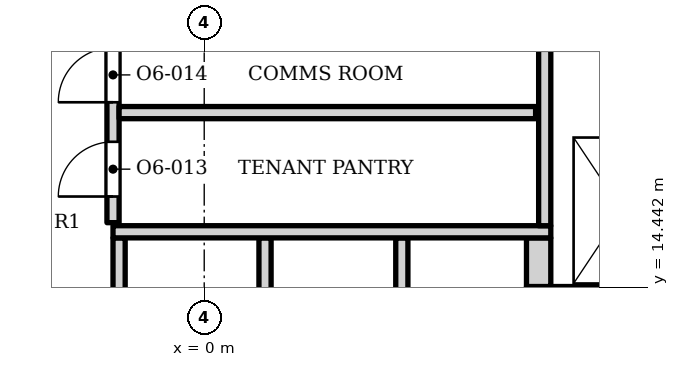
"""IFC4 building model, lengths in metres.
Left out: names, types, materials, properties, quantities, classifications, styles, units other than length and angle.
Written with IfcOpenShell. Run it as: python <this file> out.ifc"""

import sys

from ifc_helpers import new_model, si_unit, direction, frame, frame_2d, origin, place, context, subcontext, project, spatial, rectangle, extrude, element, fill, save


model = new_model("IFC4")
c1 = context("Model", 3, precision=1e-05, world=origin(), true_north=direction((0.0, 1.0)))
c2 = subcontext(c1, "Body", "Model", "MODEL_VIEW")
j1 = project(units=[si_unit("LENGTHUNIT", "METRE"), si_unit("PLANEANGLEUNIT", "RADIAN")], contexts=[c1])
p1 = place(None, origin())
s1 = spatial("IfcSite", under=j1, at=p1, CompositionType="ELEMENT")
p2 = place(p1, origin())
s2 = spatial("IfcBuilding", under=s1, at=p2, CompositionType="ELEMENT")
p3 = place(p2, frame((0.0, 0.0, 208.1)))
s3 = spatial("IfcBuildingStorey", under=s2, at=p3, CompositionType="ELEMENT", Elevation=208.1)
for number, where, z_axis, x_axis in (
    (1, (-1.4, 12.653, 0.0), (0.0, 0.0, 1.0), (0.0, 1.0, 0.0)),
    (2, (1.0, 12.653, 0.0), (0.0, 0.0, 1.0), (0.0, 1.0, 0.0)),
    (3, (3.25, 12.653, 0.0), (0.0, 0.0, 1.0), (0.0, 1.0, 0.0)),
):
    element("IfcWall", number, at=place(p3, frame(where, z_axis=z_axis, x_axis=x_axis)), inside=s3, PredefinedType="SOLIDWALL", context=c2, shape_type="SweptSolid", body=[
        extrude(rectangle(XDim=2.6, YDim=0.2, at=frame_2d((1.3, 0.0))), origin(), (0.0, 0.0, 1.0), 3.73),
    ])
p4 = place(p3, frame((5.5, 14.453, 0.0), z_axis=(0.0, 0.0, 1.0), x_axis=(0.0, 1.0, 0.0)))
e4 = element("IfcWall", 4, at=p4, inside=s3, PredefinedType="SOLIDWALL", context=c2, shape_type="SweptSolid", body=[
    extrude(rectangle(XDim=0.8, YDim=0.4, at=frame_2d((0.4, 0.0))), origin(), (0.0, 0.0, 1.0), 3.73),
])
p5 = place(p3, frame((-1.5, 15.353, 0.0), z_axis=(0.0, 0.0, 1.0), x_axis=(1.0, 0.0, 0.0)))
e5 = element("IfcWall", 5, at=p5, inside=s3, PredefinedType="SOLIDWALL", context=c2, shape_type="SweptSolid", body=[
    extrude(rectangle(XDim=7.2, YDim=0.2, at=frame_2d((3.6, 0.0))), origin(), (0.0, 0.0, 1.0), 3.73),
])
p6 = place(p3, frame((5.6, 15.453, 0.0), z_axis=(0.0, 0.0, 1.0), x_axis=(0.0, 1.0, 0.0)))
e6 = element("IfcWall", 6, at=p6, inside=s3, PredefinedType="SOLIDWALL", context=c2, shape_type="SweptSolid", body=[
    extrude(rectangle(XDim=2.9, YDim=0.2, at=frame_2d((1.45, 0.0))), origin(), (0.0, 0.0, 1.0), 3.73),
])
p7 = place(p3, frame((-1.5, 15.503, 0.0), z_axis=(0.0, 0.0, 1.0), x_axis=(0.0, 1.0, 0.0)))
e7 = element("IfcWall", 7, at=p7, inside=s3, PredefinedType="SOLIDWALL", context=c2, shape_type="SweptSolid", body=[
    extrude(rectangle(XDim=3.05, YDim=0.2, at=frame_2d((1.525, 0.0))), origin(), (0.0, 0.0, 1.0), 3.73),
])
p8 = place(p7, frame((0.43, 0.0, 0.0)))
e8 = element("IfcOpeningElement", 8, at=p8, cuts=e7, PredefinedType="OPENING", context=c2, shape_type="SweptSolid", body=[
    extrude(rectangle(XDim=0.9, YDim=2.1, at=frame_2d((0.45, 1.05))), frame((0.0, 0.11, 0.0), z_axis=(0.0, -1.0, 0.0), x_axis=(1.0, 0.0, 0.0)), (0.0, 0.0, 1.0), 0.22),
])
p9 = place(p7, frame((1.98, 0.0, 0.0)))
e9 = element("IfcOpeningElement", 9, at=p9, cuts=e7, PredefinedType="OPENING", context=c2, shape_type="SweptSolid", body=[
    extrude(rectangle(XDim=0.9, YDim=2.1, at=frame_2d((0.45, 1.05))), frame((0.0, 0.11, 0.0), z_axis=(0.0, -1.0, 0.0), x_axis=(1.0, 0.0, 0.0)), (0.0, 0.0, 1.0), 0.22),
])
p10 = place(p3, frame((-1.4, 17.312, 0.0), z_axis=(0.0, 0.0, 1.0), x_axis=(1.0, 0.0, 0.0)))
e10 = element("IfcWall", 10, at=p10, inside=s3, PredefinedType="SOLIDWALL", context=c2, shape_type="SweptSolid", body=[
    extrude(rectangle(XDim=6.85, YDim=0.2, at=frame_2d((3.425, 0.0))), origin(), (0.0, 0.0, 1.0), 3.73),
])
p11 = place(p8, origin())
e11 = element("IfcDoor", 11, at=p11, inside=s3, OperationType="SINGLE_SWING_LEFT", PredefinedType="DOOR", context=c2, shape_type="SweptSolid", body=[
    extrude(rectangle(XDim=0.9, YDim=2.1, at=frame_2d((0.45, 1.05))), frame((0.0, 0.025, 0.0), z_axis=(0.0, -1.0, 0.0), x_axis=(1.0, 0.0, 0.0)), (0.0, 0.0, 1.0), 0.05),
])
fill(e8, e11)
p12 = place(p9, origin())
e12 = element("IfcDoor", 12, at=p12, inside=s3, OperationType="SINGLE_SWING_LEFT", PredefinedType="DOOR", context=c2, shape_type="SweptSolid", body=[
    extrude(rectangle(XDim=0.9, YDim=2.1, at=frame_2d((0.45, 1.05))), frame((0.0, 0.025, 0.0), z_axis=(0.0, -1.0, 0.0), x_axis=(1.0, 0.0, 0.0)), (0.0, 0.0, 1.0), 0.05),
])
fill(e9, e12)
save(model, sys.argv[1])
